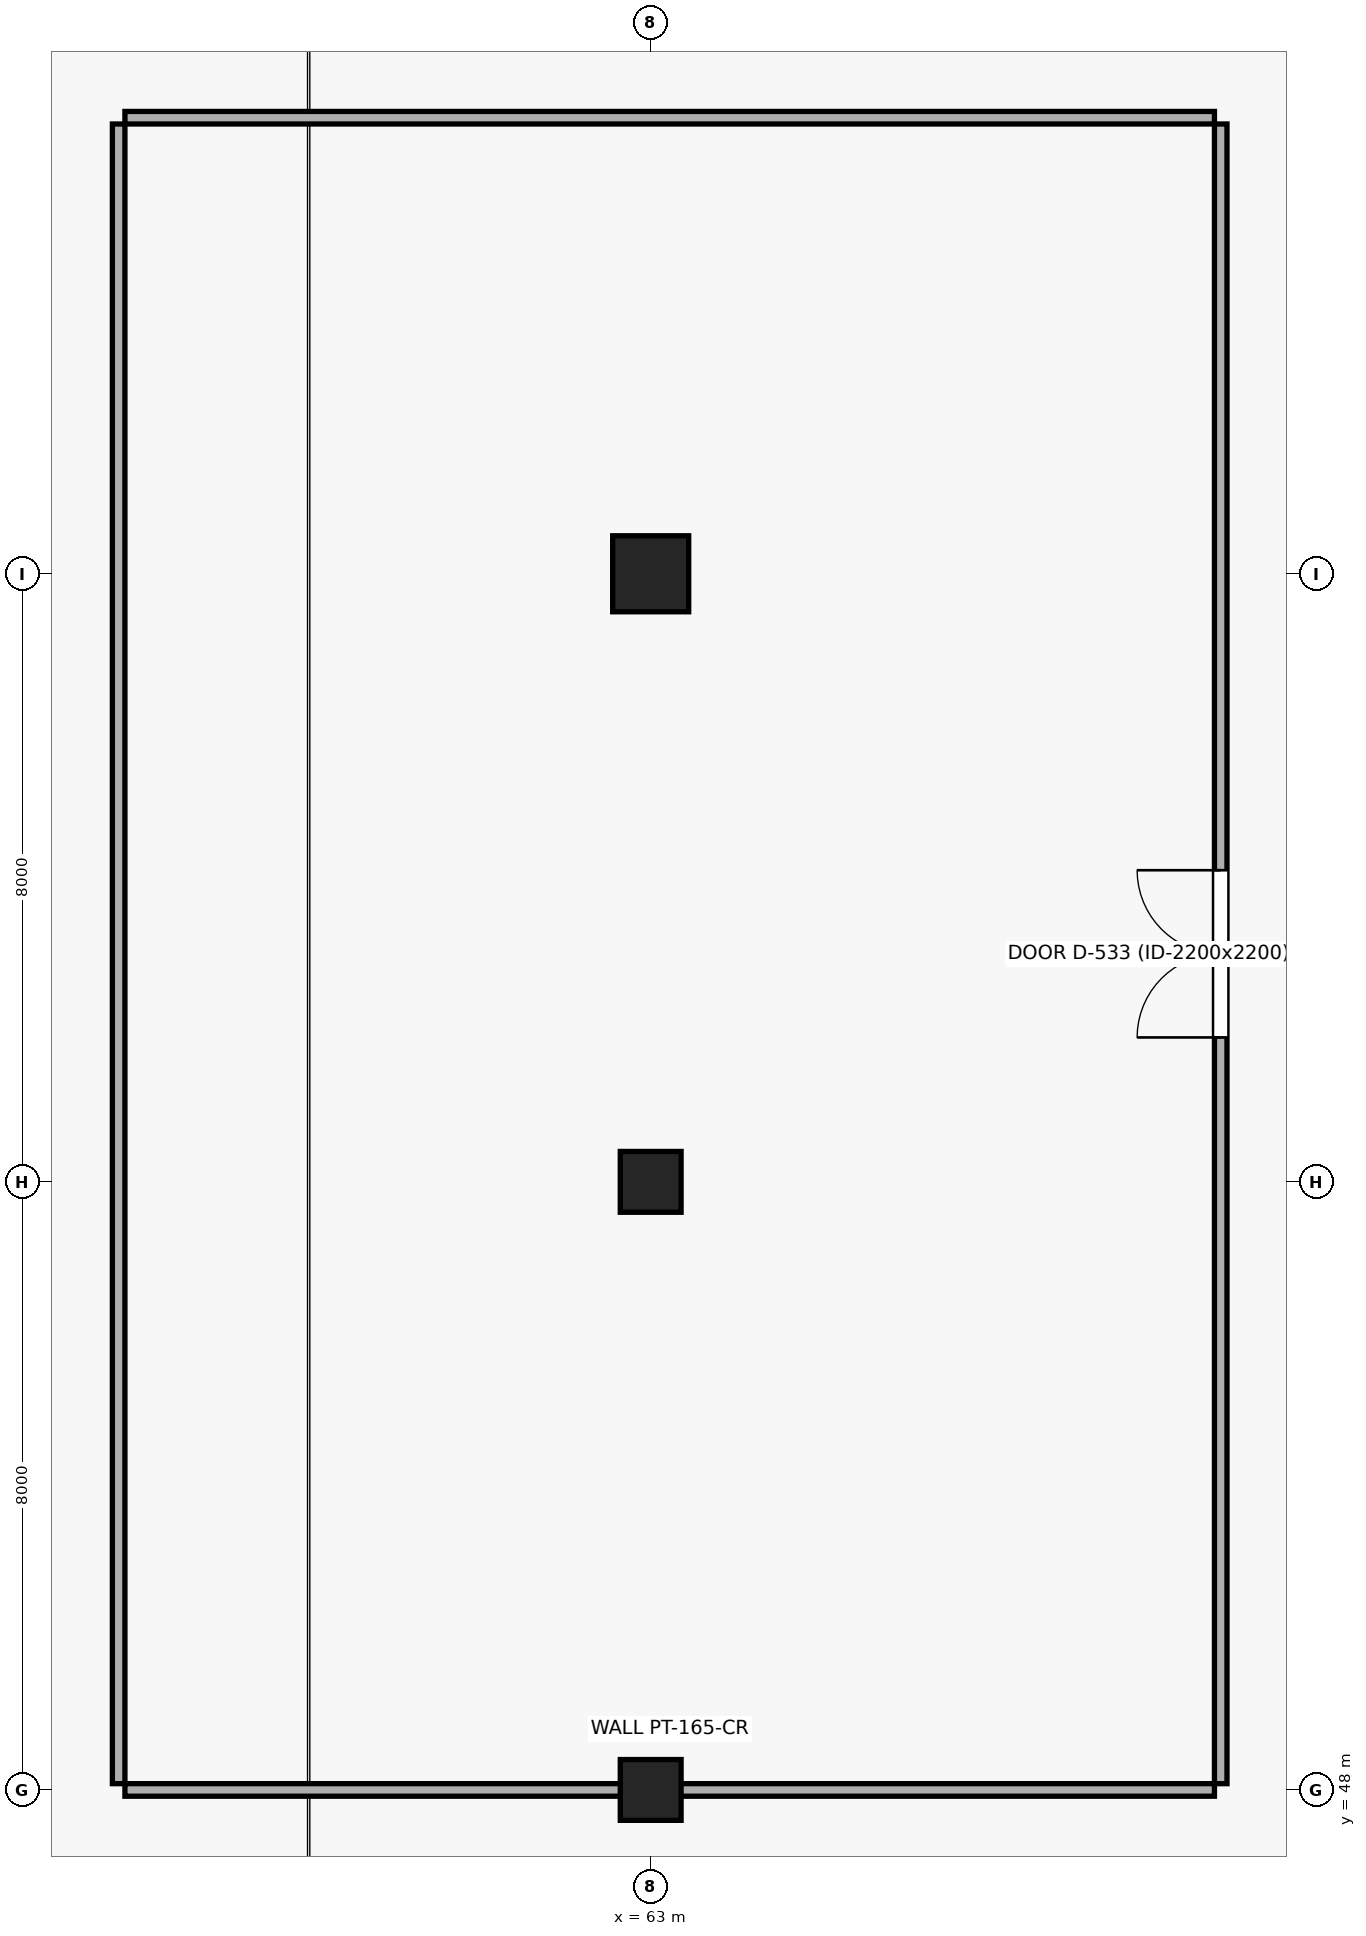
"""IFC4 building model, lengths in metres.
Left out: names, types, materials, properties, quantities, classifications, styles, units other than length and angle.
Written with IfcOpenShell. Run it as: python <this file> out.ifc"""

import sys

from ifc_helpers import new_model, si_unit, direction, frame, frame_2d, origin, origin_2d, place, context, subcontext, project, spatial, rectangle, extrude, element, fill, save


model = new_model("IFC4")
c1 = context("Model", 3, precision=1e-05, world=origin(), true_north=direction((0.0, 1.0)))
c2 = subcontext(c1, "Body", "Model", "MODEL_VIEW")
j1 = project(units=[si_unit("LENGTHUNIT", "METRE"), si_unit("PLANEANGLEUNIT", "RADIAN")], contexts=[c1])
p1 = place(None, origin())
s1 = spatial("IfcSite", under=j1, at=p1, CompositionType="ELEMENT")
p2 = place(p1, origin())
s2 = spatial("IfcBuilding", under=s1, at=p2, CompositionType="ELEMENT")
p3 = place(p2, frame((0.0, 0.0, 4.5)))
s3 = spatial("IfcBuildingStorey", under=s2, at=p3, CompositionType="ELEMENT", Elevation=4.5)
for number, where, z_axis, x_axis in (
    (1, (63.0, 48.0, 0.0), (0.0, 0.0, 1.0), (1.0, 0.0, 0.0)),
    (2, (63.0, 56.0, 0.0), (0.0, 0.0, 1.0), (1.0, 0.0, 0.0)),
):
    element("IfcColumn", number, at=place(p3, frame(where, z_axis=z_axis, x_axis=x_axis)), inside=s3, PredefinedType="COLUMN", context=c2, shape_type="SweptSolid", body=[
        extrude(rectangle(XDim=0.8, YDim=0.8, at=origin_2d()), origin(), (0.0, 0.0, 1.0), 4.5),
    ])
p4 = place(p3, frame((63.0, 64.0, 0.0), z_axis=(0.0, 0.0, 1.0), x_axis=(1.0, 0.0, 0.0)))
e3 = element("IfcColumn", 3, at=p4, inside=s3, PredefinedType="COLUMN", context=c2, shape_type="SweptSolid", body=[
    extrude(rectangle(XDim=1.0, YDim=1.0, at=origin_2d()), origin(), (0.0, 0.0, 1.0), 4.5),
])
p5 = place(p3, frame((56.083, 48.0, 0.0), z_axis=(0.0, 0.0, 1.0), x_axis=(1.0, 0.0, 0.0)))
e4 = element("IfcWall", 4, at=p5, inside=s3, PredefinedType="PARTITIONING", context=c2, shape_type="SweptSolid", body=[
    extrude(rectangle(XDim=14.335, YDim=0.165, at=frame_2d((7.167, 0.0))), origin(), (0.0, 0.0, 1.0), 3.33),
])
p6 = place(p3, frame((56.083, 70.0, 0.0), z_axis=(0.0, 0.0, 1.0), x_axis=(1.0, 0.0, 0.0)))
e5 = element("IfcWall", 5, at=p6, inside=s3, PredefinedType="PARTITIONING", context=c2, shape_type="SweptSolid", body=[
    extrude(rectangle(XDim=14.335, YDim=0.165, at=frame_2d((7.167, 0.0))), origin(), (0.0, 0.0, 1.0), 4.18),
])
p7 = place(p3, frame((56.0, 48.083, 0.0), z_axis=(0.0, 0.0, 1.0), x_axis=(0.0, 1.0, 0.0)))
e6 = element("IfcWall", 6, at=p7, inside=s3, PredefinedType="PARTITIONING", context=c2, shape_type="SweptSolid", body=[
    extrude(rectangle(XDim=21.835, YDim=0.165, at=frame_2d((10.917, 0.0))), origin(), (0.0, 0.0, 1.0), 4.18),
])
p8 = place(p3, frame((70.5, 48.083, 0.0), z_axis=(0.0, 0.0, 1.0), x_axis=(0.0, 1.0, 0.0)))
e7 = element("IfcWall", 7, at=p8, inside=s3, PredefinedType="PARTITIONING", context=c2, shape_type="SweptSolid", body=[
    extrude(rectangle(XDim=21.835, YDim=0.165, at=frame_2d((10.917, 0.0))), origin(), (0.0, 0.0, 1.0), 4.18),
])
p9 = place(p8, frame((9.817, 0.0, 0.0)))
e8 = element("IfcOpeningElement", 8, at=p9, cuts=e7, PredefinedType="OPENING", context=c2, shape_type="SweptSolid", body=[
    extrude(rectangle(XDim=2.2, YDim=2.2, at=frame_2d((1.1, 1.1))), frame((0.0, 0.094, 0.0), z_axis=(0.0, -1.0, 0.0), x_axis=(1.0, 0.0, 0.0)), (0.0, 0.0, 1.0), 0.189),
])
p10 = place(p9, origin())
e9 = element("IfcDoor", 9, at=p10, inside=s3, OperationType="DOUBLE_DOOR_SINGLE_SWING", PredefinedType="DOOR", context=c2, shape_type="SweptSolid", body=[
    extrude(rectangle(XDim=2.2, YDim=2.2, at=frame_2d((1.1, 1.1))), frame((0.0, 0.025, 0.0), z_axis=(0.0, -1.0, 0.0), x_axis=(1.0, 0.0, 0.0)), (0.0, 0.0, 1.0), 0.05),
])
fill(e8, e9)
save(model, sys.argv[1])
